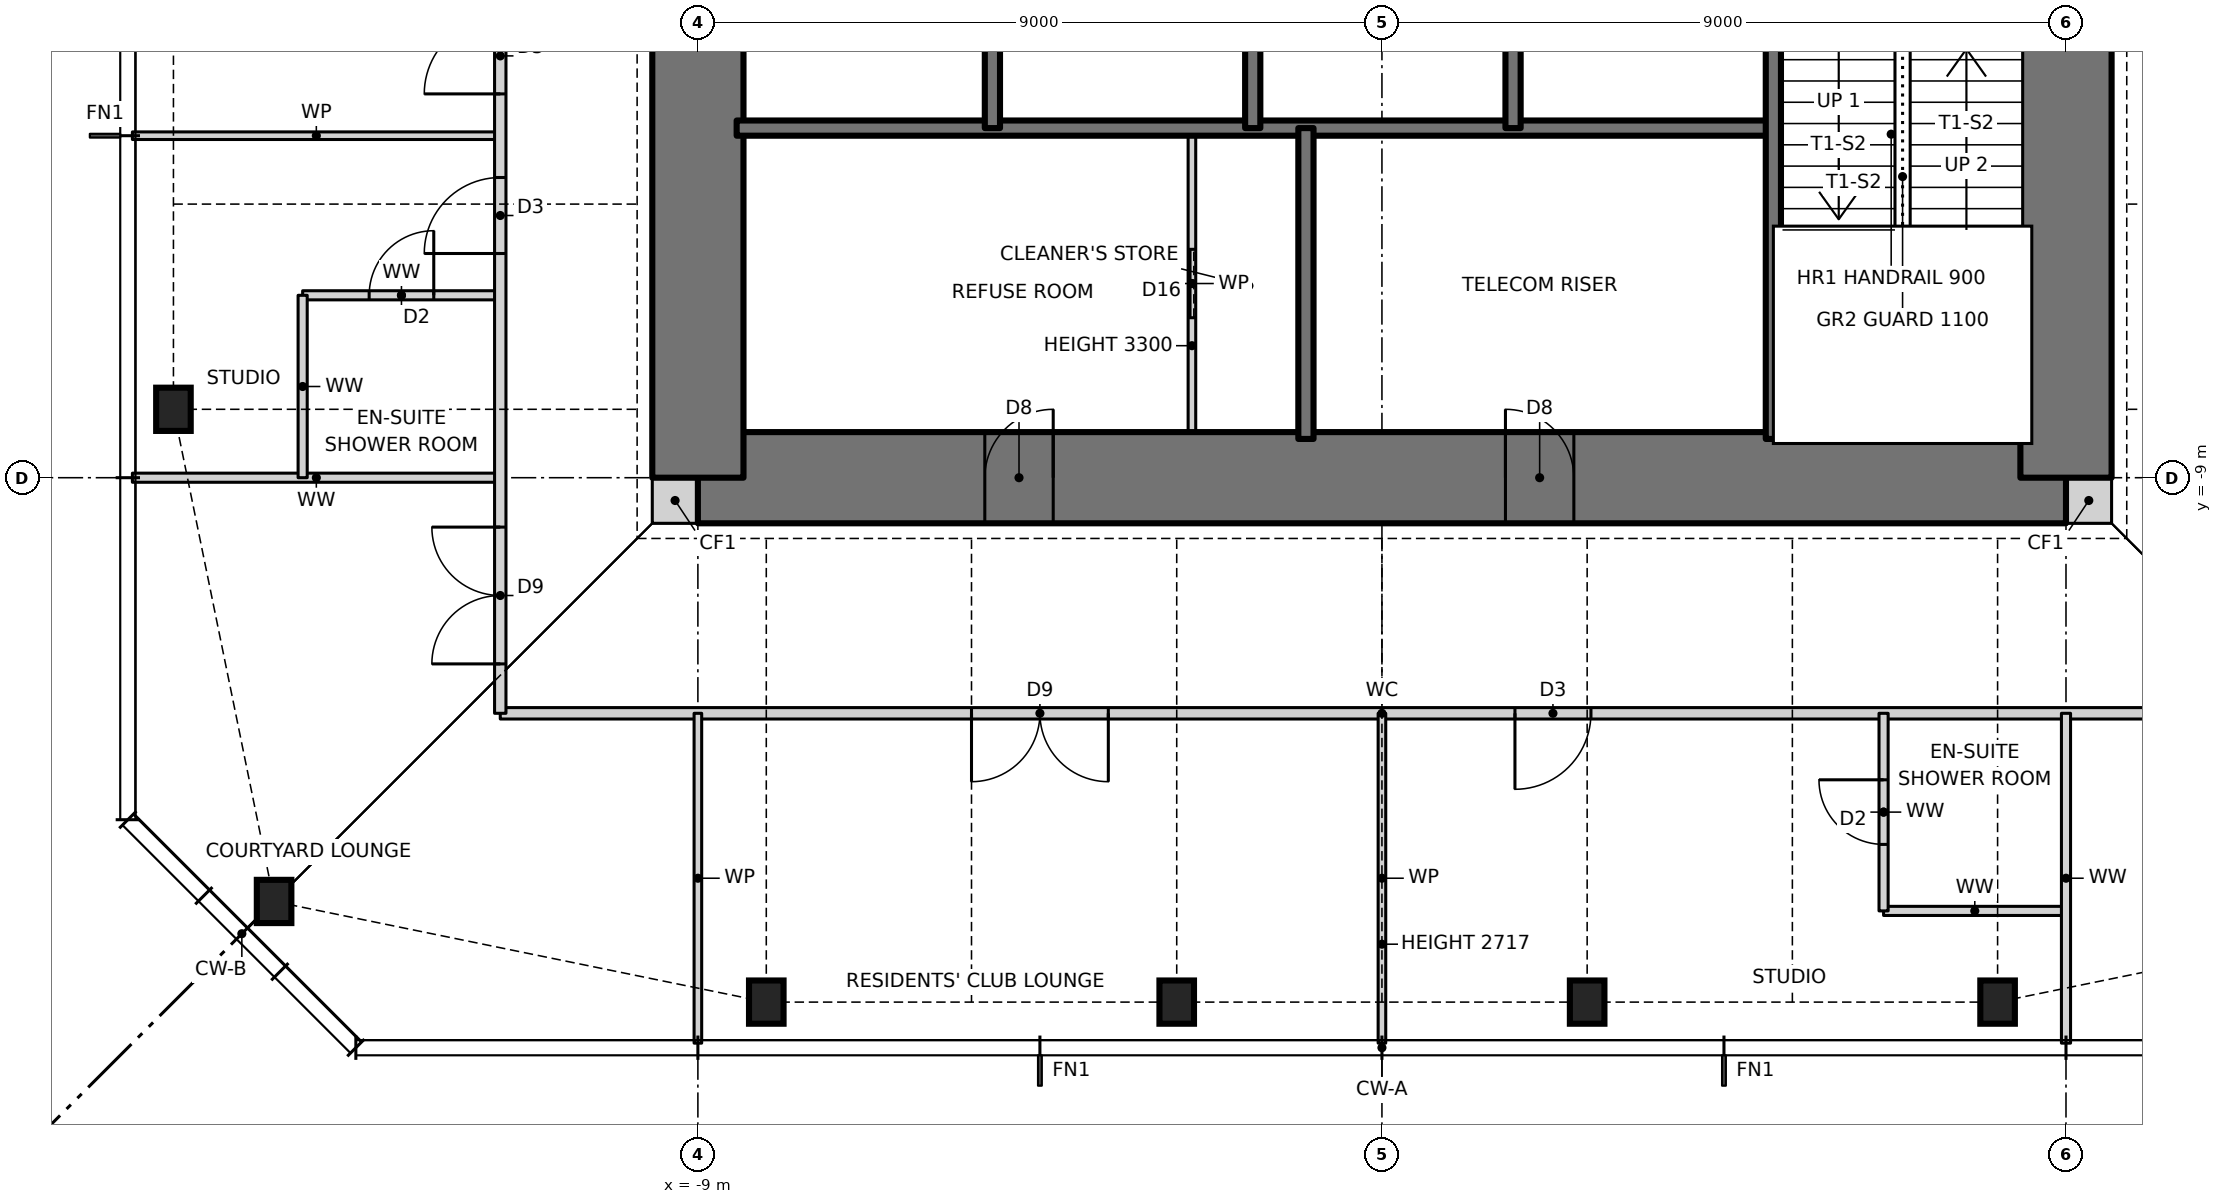
"""IFC4 building model, lengths in metres.
Left out: names, types, materials, properties, quantities, classifications, styles, units other than length and angle.
Written with IfcOpenShell. Run it as: python <this file> out.ifc"""

import sys

from ifc_helpers import new_model, si_unit, direction, frame, frame_2d, origin, origin_2d, place, context, subcontext, project, spatial, rectangle, i_section, extrude, element, fill, save


model = new_model("IFC4")
c1 = context("Model", 3, precision=1e-05, world=origin(), true_north=direction((0.0, 1.0)))
c2 = subcontext(c1, "Body", "Model", "MODEL_VIEW")
j1 = project(units=[si_unit("LENGTHUNIT", "METRE"), si_unit("PLANEANGLEUNIT", "RADIAN")], contexts=[c1])
p1 = place(None, origin())
s1 = spatial("IfcSite", under=j1, at=p1, CompositionType="ELEMENT")
p2 = place(p1, origin())
s2 = spatial("IfcBuilding", under=s1, at=p2, CompositionType="ELEMENT")
p3 = place(p2, frame((0.0, 0.0, 264.0)))
s3 = spatial("IfcBuildingStorey", under=s2, at=p3, CompositionType="ELEMENT", Elevation=264.0)
for number, where, z_axis, x_axis in (
    (1, (-14.576, -14.576, 0.0), (0.0, 0.0, 1.0), (1.0, 0.0, 0.0)),
    (2, (-8.1, -15.9, 0.0), (0.0, 0.0, 1.0), (1.0, 0.0, 0.0)),
    (3, (-2.7, -15.9, 0.0), (0.0, 0.0, 1.0), (1.0, 0.0, 0.0)),
    (4, (2.7, -15.9, 0.0), (0.0, 0.0, 1.0), (1.0, 0.0, 0.0)),
    (5, (8.1, -15.9, 0.0), (0.0, 0.0, 1.0), (1.0, 0.0, 0.0)),
    (6, (-15.9, -8.1, 0.0), (0.0, 0.0, 1.0), (1.0, 0.0, 0.0)),
):
    element("IfcColumn", number, at=place(p3, frame(where, z_axis=z_axis, x_axis=x_axis)), inside=s3, PredefinedType="COLUMN", context=c2, shape_type="SweptSolid", body=[
        extrude(i_section(OverallWidth=0.455, OverallDepth=0.569, WebThickness=0.078, FlangeThickness=0.125, at=origin_2d()), origin(), (0.0, 0.0, 1.0), 3.5),
    ])
for number, where, z_axis, x_axis in (
    (7, (-9.6, -9.3, 0.0), (0.0, 0.0, 1.0), (1.0, 0.0, 0.0)),
    (8, (9.0, -9.3, 0.0), (0.0, 0.0, 1.0), (1.0, 0.0, 0.0)),
):
    element("IfcWall", number, at=place(p3, frame(where, z_axis=z_axis, x_axis=x_axis)), inside=s3, PredefinedType="SOLIDWALL", context=c2, shape_type="SweptSolid", body=[
        extrude(rectangle(XDim=0.6, YDim=0.6, at=frame_2d((0.3, 0.0))), origin(), (0.0, 0.0, 1.0), 3.5),
    ])
p4 = place(p3, frame((-9.0, -9.0, 0.0), z_axis=(0.0, 0.0, 1.0), x_axis=(1.0, 0.0, 0.0)))
e9 = element("IfcWall", 9, at=p4, inside=s3, PredefinedType="SHEAR", context=c2, shape_type="SweptSolid", body=[
    extrude(rectangle(XDim=18.0, YDim=1.2, at=frame_2d((9.0, 0.0))), origin(), (0.0, 0.0, 1.0), 3.5),
])
p5 = place(p4, frame((3.775, 0.0, 0.0)))
e10 = element("IfcOpeningElement", 10, at=p5, cuts=e9, PredefinedType="OPENING", context=c2, shape_type="SweptSolid", body=[
    extrude(rectangle(XDim=0.9, YDim=2.1, at=frame_2d((0.45, 1.05))), frame((0.0, 0.61, 0.0), z_axis=(0.0, -1.0, 0.0), x_axis=(1.0, 0.0, 0.0)), (0.0, 0.0, 1.0), 1.22),
])
p6 = place(p4, frame((10.625, 0.0, 0.0)))
e11 = element("IfcOpeningElement", 11, at=p6, cuts=e9, PredefinedType="OPENING", context=c2, shape_type="SweptSolid", body=[
    extrude(rectangle(XDim=0.9, YDim=2.1, at=frame_2d((0.45, 1.05))), frame((0.0, 0.61, 0.0), z_axis=(0.0, -1.0, 0.0), x_axis=(1.0, 0.0, 0.0)), (0.0, 0.0, 1.0), 1.22),
])
p7 = place(p3, frame((9.0, -9.0, 0.0), z_axis=(0.0, 0.0, 1.0), x_axis=(0.0, 1.0, 0.0)))
e12 = element("IfcWall", 12, at=p7, inside=s3, PredefinedType="SHEAR", context=c2, shape_type="SweptSolid", body=[
    extrude(rectangle(XDim=18.0, YDim=1.2, at=frame_2d((9.0, 0.0))), origin(), (0.0, 0.0, 1.0), 3.5),
])
p8 = place(p7, frame((8.5, 0.0, 0.0)))
e13 = element("IfcOpeningElement", 13, at=p8, cuts=e12, PredefinedType="OPENING", context=c2, shape_type="SweptSolid", body=[
    extrude(rectangle(XDim=1.0, YDim=2.1, at=frame_2d((0.5, 1.05))), frame((0.0, 0.61, 0.0), z_axis=(0.0, -1.0, 0.0), x_axis=(1.0, 0.0, 0.0)), (0.0, 0.0, 1.0), 1.22),
])
p9 = place(p3, frame((-9.0, 9.0, 0.0), z_axis=(0.0, 0.0, 1.0), x_axis=(0.0, -1.0, 0.0)))
e14 = element("IfcWall", 14, at=p9, inside=s3, PredefinedType="SHEAR", context=c2, shape_type="SweptSolid", body=[
    extrude(rectangle(XDim=18.0, YDim=1.2, at=frame_2d((9.0, 0.0))), origin(), (0.0, 0.0, 1.0), 3.5),
])
p10 = place(p9, frame((8.5, 0.0, 0.0)))
e15 = element("IfcOpeningElement", 15, at=p10, cuts=e14, PredefinedType="OPENING", context=c2, shape_type="SweptSolid", body=[
    extrude(rectangle(XDim=1.0, YDim=2.1, at=frame_2d((0.5, 1.05))), frame((0.0, 0.61, 0.0), z_axis=(0.0, -1.0, 0.0), x_axis=(1.0, 0.0, 0.0)), (0.0, 0.0, 1.0), 1.22),
])
p11 = place(p3, frame((6.6, -14.7, 0.0), z_axis=(0.0, 0.0, 1.0), x_axis=(1.0, 0.0, 0.0)))
e16 = element("IfcWall", 16, at=p11, inside=s3, PredefinedType="PARTITIONING", context=c2, shape_type="SweptSolid", body=[
    extrude(rectangle(XDim=2.4, YDim=0.12, at=frame_2d((1.2, 0.0))), origin(), (0.0, 0.0, 1.0), 3.25),
])
p12 = place(p3, frame((-11.6, -12.1, 0.0), z_axis=(0.0, 0.0, 1.0), x_axis=(1.0, 0.0, 0.0)))
e17 = element("IfcWall", 17, at=p12, inside=s3, PredefinedType="PARTITIONING", context=c2, shape_type="SweptSolid", body=[
    extrude(rectangle(XDim=23.2, YDim=0.15, at=frame_2d((11.6, 0.0))), origin(), (0.0, 0.0, 1.0), 3.25),
])
p13 = place(p12, frame((6.2, 0.0, 0.0)))
e18 = element("IfcOpeningElement", 18, at=p13, cuts=e17, PredefinedType="OPENING", context=c2, shape_type="SweptSolid", body=[
    extrude(rectangle(XDim=1.8, YDim=2.1, at=frame_2d((0.9, 1.05))), frame((0.0, 0.085, 0.0), z_axis=(0.0, -1.0, 0.0), x_axis=(1.0, 0.0, 0.0)), (0.0, 0.0, 1.0), 0.17),
])
p14 = place(p12, frame((13.35, 0.0, 0.0)))
e19 = element("IfcOpeningElement", 19, at=p14, cuts=e17, PredefinedType="OPENING", context=c2, shape_type="SweptSolid", body=[
    extrude(rectangle(XDim=1.0, YDim=2.1, at=frame_2d((0.5, 1.05))), frame((0.0, 0.085, 0.0), z_axis=(0.0, -1.0, 0.0), x_axis=(1.0, 0.0, 0.0)), (0.0, 0.0, 1.0), 0.17),
])
p15 = place(p3, frame((-16.44, -9.0, 0.0), z_axis=(0.0, 0.0, 1.0), x_axis=(1.0, 0.0, 0.0)))
e20 = element("IfcWall", 20, at=p15, inside=s3, PredefinedType="PARTITIONING", context=c2, shape_type="SweptSolid", body=[
    extrude(rectangle(XDim=4.84, YDim=0.12, at=frame_2d((2.42, 0.0))), origin(), (0.0, 0.0, 1.0), 3.25),
])
p16 = place(p3, frame((-14.2, -6.6, 0.0), z_axis=(0.0, 0.0, 1.0), x_axis=(1.0, 0.0, 0.0)))
e21 = element("IfcWall", 21, at=p16, inside=s3, PredefinedType="PARTITIONING", context=c2, shape_type="SweptSolid", body=[
    extrude(rectangle(XDim=2.6, YDim=0.12, at=frame_2d((1.3, 0.0))), origin(), (0.0, 0.0, 1.0), 3.25),
])
p17 = place(p16, frame((0.875, 0.0, 0.0)))
e22 = element("IfcOpeningElement", 22, at=p17, cuts=e21, PredefinedType="OPENING", context=c2, shape_type="SweptSolid", body=[
    extrude(rectangle(XDim=0.85, YDim=2.1, at=frame_2d((0.425, 1.05))), frame((0.0, 0.07, 0.0), z_axis=(0.0, -1.0, 0.0), x_axis=(1.0, 0.0, 0.0)), (0.0, 0.0, 1.0), 0.14),
])
p18 = place(p3, frame((-16.44, -4.5, 0.0), z_axis=(0.0, 0.0, 1.0), x_axis=(1.0, 0.0, 0.0)))
e23 = element("IfcWall", 23, at=p18, inside=s3, PredefinedType="PARTITIONING", context=c2, shape_type="SweptSolid", body=[
    extrude(rectangle(XDim=4.84, YDim=0.1, at=frame_2d((2.42, 0.0))), origin(), (0.0, 0.0, 1.0), 3.25),
])
p19 = place(p3, frame((-8.49, -4.4, 0.0), z_axis=(0.0, 0.0, 1.0), x_axis=(1.0, 0.0, 0.0)))
e24 = element("IfcWall", 24, at=p19, inside=s3, PredefinedType="SOLIDWALL", context=c2, shape_type="SweptSolid", body=[
    extrude(rectangle(XDim=13.64, YDim=0.2, at=frame_2d((6.82, 0.0))), origin(), (0.0, 0.0, 1.0), 3.5),
])
p20 = place(p3, frame((9.0, -16.44, 0.0), z_axis=(0.0, 0.0, 1.0), x_axis=(0.0, 1.0, 0.0)))
e25 = element("IfcWall", 25, at=p20, inside=s3, PredefinedType="PARTITIONING", context=c2, shape_type="SweptSolid", body=[
    extrude(rectangle(XDim=4.34, YDim=0.12, at=frame_2d((2.17, 0.0))), origin(), (0.0, 0.0, 1.0), 3.25),
])
p21 = place(p3, frame((6.6, -14.7, 0.0), z_axis=(0.0, 0.0, 1.0), x_axis=(0.0, 1.0, 0.0)))
e26 = element("IfcWall", 26, at=p21, inside=s3, PredefinedType="PARTITIONING", context=c2, shape_type="SweptSolid", body=[
    extrude(rectangle(XDim=2.6, YDim=0.12, at=frame_2d((1.3, 0.0))), origin(), (0.0, 0.0, 1.0), 3.25),
])
p22 = place(p21, frame((0.875, 0.0, 0.0)))
e27 = element("IfcOpeningElement", 27, at=p22, cuts=e26, PredefinedType="OPENING", context=c2, shape_type="SweptSolid", body=[
    extrude(rectangle(XDim=0.85, YDim=2.1, at=frame_2d((0.425, 1.05))), frame((0.0, 0.07, 0.0), z_axis=(0.0, -1.0, 0.0), x_axis=(1.0, 0.0, 0.0)), (0.0, 0.0, 1.0), 0.14),
])
p23 = place(p3, frame((5.15, -8.49, 0.0), z_axis=(0.0, 0.0, 1.0), x_axis=(0.0, 1.0, 0.0)))
e28 = element("IfcWall", 28, at=p23, inside=s3, PredefinedType="SOLIDWALL", context=c2, shape_type="SweptSolid", body=[
    extrude(rectangle(XDim=13.09, YDim=0.2, at=frame_2d((6.545, 0.0))), origin(), (0.0, 0.0, 1.0), 3.5),
])
p24 = place(p23, frame((7.89, 0.0, 0.0)))
e29 = element("IfcOpeningElement", 29, at=p24, cuts=e28, PredefinedType="OPENING", context=c2, shape_type="SweptSolid", body=[
    extrude(rectangle(XDim=1.2, YDim=2.1, at=frame_2d((0.6, 1.05))), frame((0.0, 0.11, 0.0), z_axis=(0.0, -1.0, 0.0), x_axis=(1.0, 0.0, 0.0)), (0.0, 0.0, 1.0), 0.22),
])
p25 = place(p3, frame((1.725, -4.4, 0.0), z_axis=(0.0, 0.0, 1.0), x_axis=(0.0, 1.0, 0.0)))
e30 = element("IfcWall", 30, at=p25, inside=s3, PredefinedType="SOLIDWALL", context=c2, shape_type="SweptSolid", body=[
    extrude(rectangle(XDim=2.8, YDim=0.2, at=frame_2d((1.4, 0.0))), origin(), (0.0, 0.0, 1.0), 3.5),
])
p26 = place(p3, frame((0.0, -16.44, 0.0), z_axis=(0.0, 0.0, 1.0), x_axis=(0.0, 1.0, 0.0)))
e31 = element("IfcWall", 31, at=p26, inside=s3, PredefinedType="PARTITIONING", context=c2, shape_type="SweptSolid", body=[
    extrude(rectangle(XDim=4.34, YDim=0.1, at=frame_2d((2.17, 0.0))), origin(), (0.0, 0.0, 1.0), 2.717),
])
p27 = place(p3, frame((-1.0, -8.49, 0.0), z_axis=(0.0, 0.0, 1.0), x_axis=(0.0, 1.0, 0.0)))
e32 = element("IfcWall", 32, at=p27, inside=s3, PredefinedType="SOLIDWALL", context=c2, shape_type="SweptSolid", body=[
    extrude(rectangle(XDim=4.09, YDim=0.2, at=frame_2d((2.045, 0.0))), origin(), (0.0, 0.0, 1.0), 3.5),
])
p28 = place(p3, frame((-1.7, -4.4, 0.0), z_axis=(0.0, 0.0, 1.0), x_axis=(0.0, 1.0, 0.0)))
e33 = element("IfcWall", 33, at=p28, inside=s3, PredefinedType="SOLIDWALL", context=c2, shape_type="SweptSolid", body=[
    extrude(rectangle(XDim=2.8, YDim=0.2, at=frame_2d((1.4, 0.0))), origin(), (0.0, 0.0, 1.0), 3.5),
])
p29 = place(p3, frame((-2.5, -8.49, 0.0), z_axis=(0.0, 0.0, 1.0), x_axis=(0.0, 1.0, 0.0)))
e34 = element("IfcWall", 34, at=p29, inside=s3, PredefinedType="PARTITIONING", context=c2, shape_type="SweptSolid", body=[
    extrude(rectangle(XDim=4.09, YDim=0.1, at=frame_2d((2.045, 0.0))), origin(), (0.0, 0.0, 1.0), 3.3),
])
p30 = place(p29, frame((1.595, 0.0, 0.0)))
e35 = element("IfcOpeningElement", 35, at=p30, cuts=e34, PredefinedType="OPENING", context=c2, shape_type="SweptSolid", body=[
    extrude(rectangle(XDim=0.9, YDim=2.1, at=frame_2d((0.45, 1.05))), frame((0.0, 0.06, 0.0), z_axis=(0.0, -1.0, 0.0), x_axis=(1.0, 0.0, 0.0)), (0.0, 0.0, 1.0), 0.12),
])
p31 = place(p3, frame((-5.125, -4.4, 0.0), z_axis=(0.0, 0.0, 1.0), x_axis=(0.0, 1.0, 0.0)))
e36 = element("IfcWall", 36, at=p31, inside=s3, PredefinedType="SOLIDWALL", context=c2, shape_type="SweptSolid", body=[
    extrude(rectangle(XDim=2.8, YDim=0.2, at=frame_2d((1.4, 0.0))), origin(), (0.0, 0.0, 1.0), 3.5),
])
p32 = place(p3, frame((-9.0, -16.44, 0.0), z_axis=(0.0, 0.0, 1.0), x_axis=(0.0, 1.0, 0.0)))
e37 = element("IfcWall", 37, at=p32, inside=s3, PredefinedType="PARTITIONING", context=c2, shape_type="SweptSolid", body=[
    extrude(rectangle(XDim=4.34, YDim=0.1, at=frame_2d((2.17, 0.0))), origin(), (0.0, 0.0, 1.0), 3.25),
])
p33 = place(p3, frame((-11.6, -12.1, 0.0), z_axis=(0.0, 0.0, 1.0), x_axis=(0.0, 1.0, 0.0)))
e38 = element("IfcWall", 38, at=p33, inside=s3, PredefinedType="PARTITIONING", context=c2, shape_type="SweptSolid", body=[
    extrude(rectangle(XDim=23.7, YDim=0.15, at=frame_2d((11.85, 0.0))), origin(), (0.0, 0.0, 1.0), 3.25),
])
p34 = place(p33, frame((17.15, 0.0, 0.0)))
e39 = element("IfcOpeningElement", 39, at=p34, cuts=e38, PredefinedType="OPENING", context=c2, shape_type="SweptSolid", body=[
    extrude(rectangle(XDim=1.0, YDim=2.1, at=frame_2d((0.5, 1.05))), frame((0.0, 0.085, 0.0), z_axis=(0.0, -1.0, 0.0), x_axis=(1.0, 0.0, 0.0)), (0.0, 0.0, 1.0), 0.17),
])
p35 = place(p33, frame((13.45, 0.0, 0.0)))
e40 = element("IfcOpeningElement", 40, at=p35, cuts=e38, PredefinedType="OPENING", context=c2, shape_type="SweptSolid", body=[
    extrude(rectangle(XDim=1.8, YDim=2.1, at=frame_2d((0.9, 1.05))), frame((0.0, 0.085, 0.0), z_axis=(0.0, -1.0, 0.0), x_axis=(1.0, 0.0, 0.0)), (0.0, 0.0, 1.0), 0.17),
])
p36 = place(p33, frame((8.15, 0.0, 0.0)))
e41 = element("IfcOpeningElement", 41, at=p36, cuts=e38, PredefinedType="OPENING", context=c2, shape_type="SweptSolid", body=[
    extrude(rectangle(XDim=1.0, YDim=2.1, at=frame_2d((0.5, 1.05))), frame((0.0, 0.085, 0.0), z_axis=(0.0, -1.0, 0.0), x_axis=(1.0, 0.0, 0.0)), (0.0, 0.0, 1.0), 0.17),
])
p37 = place(p33, frame((6.05, 0.0, 0.0)))
e42 = element("IfcOpeningElement", 42, at=p37, cuts=e38, PredefinedType="OPENING", context=c2, shape_type="SweptSolid", body=[
    extrude(rectangle(XDim=1.0, YDim=2.1, at=frame_2d((0.5, 1.05))), frame((0.0, 0.085, 0.0), z_axis=(0.0, -1.0, 0.0), x_axis=(1.0, 0.0, 0.0)), (0.0, 0.0, 1.0), 0.17),
])
p38 = place(p33, frame((0.65, 0.0, 0.0)))
e43 = element("IfcOpeningElement", 43, at=p38, cuts=e38, PredefinedType="OPENING", context=c2, shape_type="SweptSolid", body=[
    extrude(rectangle(XDim=1.8, YDim=2.1, at=frame_2d((0.9, 1.05))), frame((0.0, 0.085, 0.0), z_axis=(0.0, -1.0, 0.0), x_axis=(1.0, 0.0, 0.0)), (0.0, 0.0, 1.0), 0.17),
])
p39 = place(p3, frame((-14.2, -9.0, 0.0), z_axis=(0.0, 0.0, 1.0), x_axis=(0.0, 1.0, 0.0)))
e44 = element("IfcWall", 44, at=p39, inside=s3, PredefinedType="PARTITIONING", context=c2, shape_type="SweptSolid", body=[
    extrude(rectangle(XDim=2.4, YDim=0.12, at=frame_2d((1.2, 0.0))), origin(), (0.0, 0.0, 1.0), 3.25),
])
p40 = place(p30, origin())
e45 = element("IfcDoor", 45, at=p40, inside=s3, OperationType="SLIDING_TO_LEFT", PredefinedType="DOOR", context=c2, shape_type="SweptSolid", body=[
    extrude(rectangle(XDim=0.9, YDim=2.1, at=frame_2d((0.45, 1.05))), frame((0.0, 0.025, 0.0), z_axis=(0.0, -1.0, 0.0), x_axis=(1.0, 0.0, 0.0)), (0.0, 0.0, 1.0), 0.05),
])
fill(e35, e45)
p41 = place(p13, frame((1.8, 0.0, 0.0), z_axis=(0.0, 0.0, 1.0), x_axis=(-1.0, 0.0, 0.0)))
e46 = element("IfcDoor", 46, at=p41, inside=s3, OperationType="DOUBLE_DOOR_SINGLE_SWING", PredefinedType="DOOR", context=c2, shape_type="SweptSolid", body=[
    extrude(rectangle(XDim=1.8, YDim=2.1, at=frame_2d((0.9, 1.05))), frame((0.0, 0.025, 0.0), z_axis=(0.0, -1.0, 0.0), x_axis=(1.0, 0.0, 0.0)), (0.0, 0.0, 1.0), 0.05),
])
fill(e18, e46)
p42 = place(p14, frame((1.0, 0.0, 0.0), z_axis=(0.0, 0.0, 1.0), x_axis=(-1.0, 0.0, 0.0)))
e47 = element("IfcDoor", 47, at=p42, inside=s3, OperationType="SINGLE_SWING_RIGHT", PredefinedType="DOOR", context=c2, shape_type="SweptSolid", body=[
    extrude(rectangle(XDim=1.0, YDim=2.1, at=frame_2d((0.5, 1.05))), frame((0.0, 0.025, 0.0), z_axis=(0.0, -1.0, 0.0), x_axis=(1.0, 0.0, 0.0)), (0.0, 0.0, 1.0), 0.05),
])
fill(e19, e47)
p43 = place(p22, origin())
e48 = element("IfcDoor", 48, at=p43, inside=s3, OperationType="SINGLE_SWING_RIGHT", PredefinedType="DOOR", context=c2, shape_type="SweptSolid", body=[
    extrude(rectangle(XDim=0.85, YDim=2.1, at=frame_2d((0.425, 1.05))), frame((0.0, 0.025, 0.0), z_axis=(0.0, -1.0, 0.0), x_axis=(1.0, 0.0, 0.0)), (0.0, 0.0, 1.0), 0.05),
])
fill(e27, e48)
p44 = place(p36, origin())
e49 = element("IfcDoor", 49, at=p44, inside=s3, OperationType="SINGLE_SWING_LEFT", PredefinedType="DOOR", context=c2, shape_type="SweptSolid", body=[
    extrude(rectangle(XDim=1.0, YDim=2.1, at=frame_2d((0.5, 1.05))), frame((0.0, 0.025, 0.0), z_axis=(0.0, -1.0, 0.0), x_axis=(1.0, 0.0, 0.0)), (0.0, 0.0, 1.0), 0.05),
])
fill(e41, e49)
p45 = place(p37, origin())
e50 = element("IfcDoor", 50, at=p45, inside=s3, OperationType="SINGLE_SWING_LEFT", PredefinedType="DOOR", context=c2, shape_type="SweptSolid", body=[
    extrude(rectangle(XDim=1.0, YDim=2.1, at=frame_2d((0.5, 1.05))), frame((0.0, 0.025, 0.0), z_axis=(0.0, -1.0, 0.0), x_axis=(1.0, 0.0, 0.0)), (0.0, 0.0, 1.0), 0.05),
])
fill(e42, e50)
p46 = place(p17, origin())
e51 = element("IfcDoor", 51, at=p46, inside=s3, OperationType="SINGLE_SWING_RIGHT", PredefinedType="DOOR", context=c2, shape_type="SweptSolid", body=[
    extrude(rectangle(XDim=0.85, YDim=2.1, at=frame_2d((0.425, 1.05))), frame((0.0, 0.025, 0.0), z_axis=(0.0, -1.0, 0.0), x_axis=(1.0, 0.0, 0.0)), (0.0, 0.0, 1.0), 0.05),
])
fill(e22, e51)
p47 = place(p38, origin())
e52 = element("IfcDoor", 52, at=p47, inside=s3, OperationType="DOUBLE_DOOR_SINGLE_SWING", PredefinedType="DOOR", context=c2, shape_type="SweptSolid", body=[
    extrude(rectangle(XDim=1.8, YDim=2.1, at=frame_2d((0.9, 1.05))), frame((0.0, 0.025, 0.0), z_axis=(0.0, -1.0, 0.0), x_axis=(1.0, 0.0, 0.0)), (0.0, 0.0, 1.0), 0.05),
])
fill(e43, e52)
p48 = place(p5, origin())
e53 = element("IfcDoor", 53, at=p48, inside=s3, OperationType="SINGLE_SWING_RIGHT", PredefinedType="DOOR", context=c2, shape_type="SweptSolid", body=[
    extrude(rectangle(XDim=0.9, YDim=2.1, at=frame_2d((0.45, 1.05))), frame((0.0, 0.025, 0.0), z_axis=(0.0, -1.0, 0.0), x_axis=(1.0, 0.0, 0.0)), (0.0, 0.0, 1.0), 0.05),
])
fill(e10, e53)
p49 = place(p6, origin())
e54 = element("IfcDoor", 54, at=p49, inside=s3, OperationType="SINGLE_SWING_LEFT", PredefinedType="DOOR", context=c2, shape_type="SweptSolid", body=[
    extrude(rectangle(XDim=0.9, YDim=2.1, at=frame_2d((0.45, 1.05))), frame((0.0, 0.025, 0.0), z_axis=(0.0, -1.0, 0.0), x_axis=(1.0, 0.0, 0.0)), (0.0, 0.0, 1.0), 0.05),
])
fill(e11, e54)
save(model, sys.argv[1])
